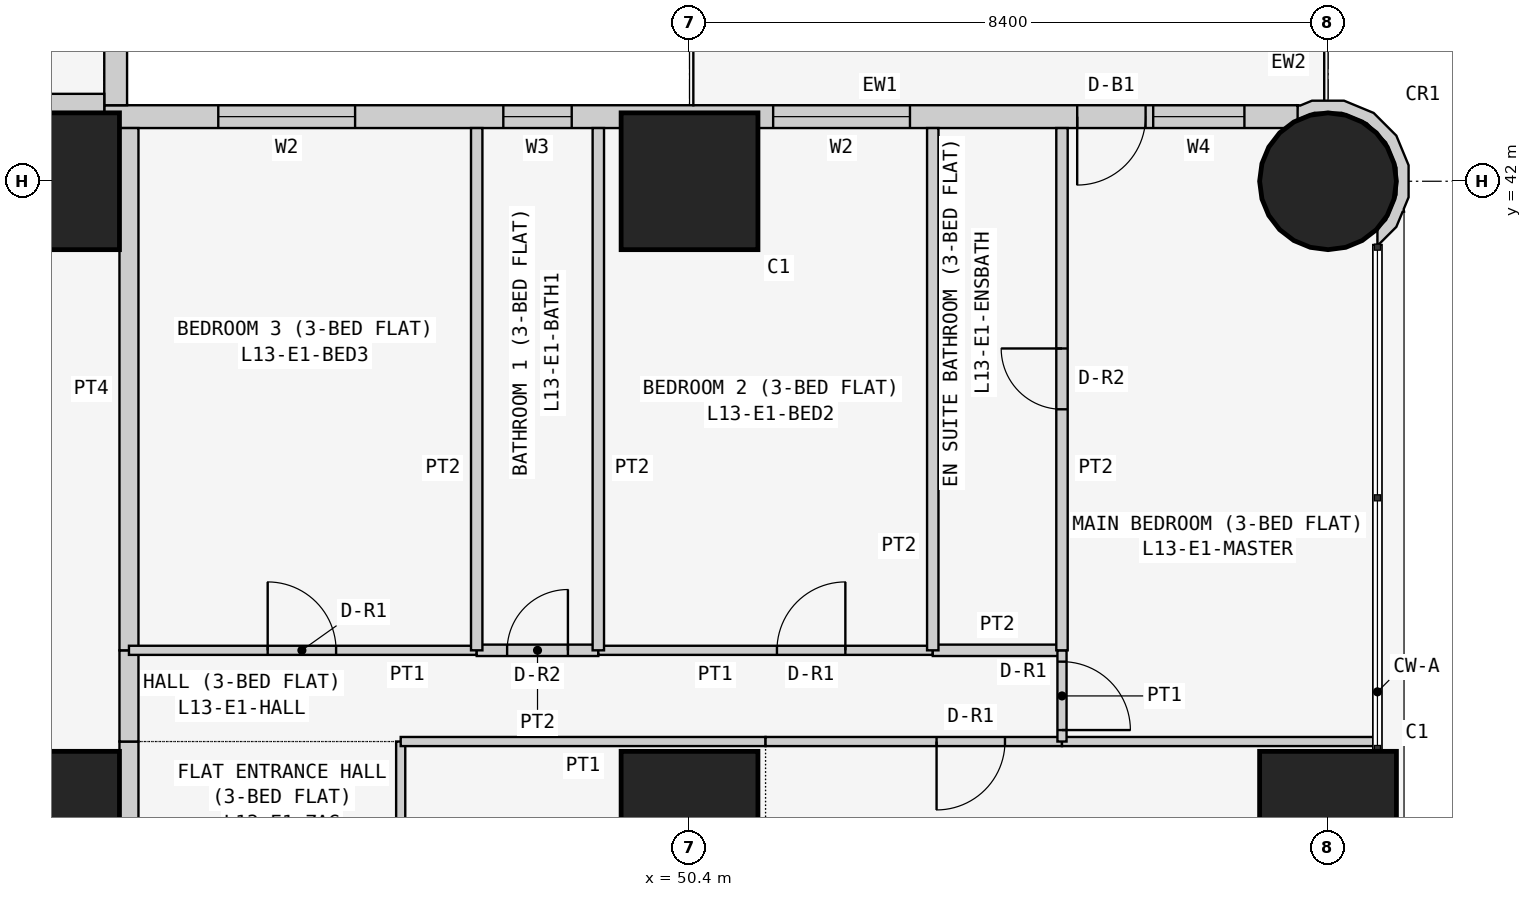
"""IFC4 building model, lengths in metres.
Left out: names, types, materials, properties, quantities, classifications, styles, units other than length and angle.
Written with IfcOpenShell. Run it as: python <this file> out.ifc"""

import sys

from ifc_helpers import new_model, si_unit, direction, frame, frame_2d, origin, origin_2d, place, context, subcontext, project, spatial, polyline, rectangle, circle, outline, extrude, element, fill, save


model = new_model("IFC4")
c1 = context("Model", 3, precision=1e-05, world=origin(), true_north=direction((0.0, 1.0)))
c2 = subcontext(c1, "Body", "Model", "MODEL_VIEW")
j1 = project(units=[si_unit("LENGTHUNIT", "METRE"), si_unit("PLANEANGLEUNIT", "RADIAN")], contexts=[c1])
p1 = place(None, origin())
s1 = spatial("IfcSite", under=j1, at=p1, CompositionType="ELEMENT")
p2 = place(p1, origin())
s2 = spatial("IfcBuilding", under=s1, at=p2, CompositionType="ELEMENT")
p3 = place(p2, frame((0.0, 0.0, 56.1)))
s3 = spatial("IfcBuildingStorey", under=s2, at=p3, CompositionType="ELEMENT", Elevation=56.1)
for number, where, z_axis, x_axis in (
    (1, (42.0, 33.6, 0.0), (0.0, 0.0, 1.0), (1.0, 0.0, 0.0)),
    (2, (42.0, 42.0, 0.0), (0.0, 0.0, 1.0), (1.0, 0.0, 0.0)),
    (3, (50.4, 33.6, 0.0), (0.0, 0.0, 1.0), (1.0, 0.0, 0.0)),
    (4, (50.4, 42.0, 0.0), (0.0, 0.0, 1.0), (1.0, 0.0, 0.0)),
    (5, (58.8, 33.6, 0.0), (0.0, 0.0, 1.0), (1.0, 0.0, 0.0)),
):
    element("IfcColumn", number, at=place(p3, frame(where, z_axis=z_axis, x_axis=x_axis)), inside=s3, PredefinedType="COLUMN", context=c2, shape_type="SweptSolid", body=[
        extrude(rectangle(XDim=1.8, YDim=1.8, at=origin_2d()), origin(), (0.0, 0.0, 1.0), 3.6),
    ])
p4 = place(p3, frame((58.8, 42.0, 0.0), z_axis=(0.0, 0.0, 1.0), x_axis=(1.0, 0.0, 0.0)))
e6 = element("IfcColumn", 6, at=p4, inside=s3, PredefinedType="COLUMN", context=c2, shape_type="SweptSolid", body=[
    extrude(circle(Radius=0.9, at=origin_2d()), origin(), (0.0, 0.0, 1.0), 3.6),
])
p5 = place(p3, frame((58.4, 42.85, 0.0), z_axis=(0.0, 0.0, 1.0), x_axis=(-1.0, 0.0, 0.0)))
e7 = element("IfcWall", 7, at=p5, inside=s3, PredefinedType="SOLIDWALL", context=c2, shape_type="SweptSolid", body=[
    extrude(rectangle(XDim=15.7, YDim=0.3, at=frame_2d((7.85, 0.0))), origin(), (0.0, 0.0, 1.0), 3.45),
])
p6 = place(p5, frame((12.4, 0.0, 0.9)))
e8 = element("IfcOpeningElement", 8, at=p6, cuts=e7, PredefinedType="OPENING", context=c2, shape_type="SweptSolid", body=[
    extrude(rectangle(XDim=1.8, YDim=1.5, at=frame_2d((0.9, 0.75))), frame((0.0, 0.16, 0.0), z_axis=(0.0, -1.0, 0.0), x_axis=(1.0, 0.0, 0.0)), (0.0, 0.0, 1.0), 0.32),
])
p7 = place(p5, frame((9.55, 0.0, 1.5)))
e9 = element("IfcOpeningElement", 9, at=p7, cuts=e7, PredefinedType="OPENING", context=c2, shape_type="SweptSolid", body=[
    extrude(rectangle(XDim=0.9, YDim=0.7, at=frame_2d((0.45, 0.35))), frame((0.0, 0.16, 0.0), z_axis=(0.0, -1.0, 0.0), x_axis=(1.0, 0.0, 0.0)), (0.0, 0.0, 1.0), 0.32),
])
p8 = place(p5, frame((5.1, 0.0, 0.9)))
e10 = element("IfcOpeningElement", 10, at=p8, cuts=e7, PredefinedType="OPENING", context=c2, shape_type="SweptSolid", body=[
    extrude(rectangle(XDim=1.8, YDim=1.5, at=frame_2d((0.9, 0.75))), frame((0.0, 0.16, 0.0), z_axis=(0.0, -1.0, 0.0), x_axis=(1.0, 0.0, 0.0)), (0.0, 0.0, 1.0), 0.32),
])
p9 = place(p5, frame((2.0, 0.0, 0.0)))
e11 = element("IfcOpeningElement", 11, at=p9, cuts=e7, PredefinedType="OPENING", context=c2, shape_type="SweptSolid", body=[
    extrude(rectangle(XDim=0.9, YDim=2.4, at=frame_2d((0.45, 1.2))), frame((0.0, 0.16, 0.0), z_axis=(0.0, -1.0, 0.0), x_axis=(1.0, 0.0, 0.0)), (0.0, 0.0, 1.0), 0.32),
])
p10 = place(p5, frame((0.7, 0.0, 0.9)))
e12 = element("IfcOpeningElement", 12, at=p10, cuts=e7, PredefinedType="OPENING", context=c2, shape_type="SweptSolid", body=[
    extrude(rectangle(XDim=1.2, YDim=1.5, at=frame_2d((0.6, 0.75))), frame((0.0, 0.16, 0.0), z_axis=(0.0, -1.0, 0.0), x_axis=(1.0, 0.0, 0.0)), (0.0, 0.0, 1.0), 0.32),
])
p11 = place(p3, frame((42.85, 43.0, 0.0), z_axis=(0.0, 0.0, 1.0), x_axis=(0.0, 1.0, 0.0)))
e13 = element("IfcWall", 13, at=p11, inside=s3, PredefinedType="SOLIDWALL", context=c2, shape_type="SweptSolid", body=[
    extrude(rectangle(XDim=15.4, YDim=0.3, at=frame_2d((7.7, 0.0))), origin(), (0.0, 0.0, 1.0), 3.45),
])
p12 = place(p11, frame((1.2, 0.0, 0.9)))
e14 = element("IfcOpeningElement", 14, at=p12, cuts=e13, PredefinedType="OPENING", context=c2, shape_type="SweptSolid", body=[
    extrude(rectangle(XDim=1.8, YDim=1.5, at=frame_2d((0.9, 0.75))), frame((0.0, 0.16, 0.0), z_axis=(0.0, -1.0, 0.0), x_axis=(1.0, 0.0, 0.0)), (0.0, 0.0, 1.0), 0.32),
])
p13 = place(p11, frame((4.95, 0.0, 1.5)))
e15 = element("IfcOpeningElement", 15, at=p13, cuts=e13, PredefinedType="OPENING", context=c2, shape_type="SweptSolid", body=[
    extrude(rectangle(XDim=0.9, YDim=0.7, at=frame_2d((0.45, 0.35))), frame((0.0, 0.16, 0.0), z_axis=(0.0, -1.0, 0.0), x_axis=(1.0, 0.0, 0.0)), (0.0, 0.0, 1.0), 0.32),
])
p14 = place(p11, frame((8.5, 0.0, 0.9)))
e16 = element("IfcOpeningElement", 16, at=p14, cuts=e13, PredefinedType="OPENING", context=c2, shape_type="SweptSolid", body=[
    extrude(rectangle(XDim=1.8, YDim=1.5, at=frame_2d((0.9, 0.75))), frame((0.0, 0.16, 0.0), z_axis=(0.0, -1.0, 0.0), x_axis=(1.0, 0.0, 0.0)), (0.0, 0.0, 1.0), 0.32),
])
p15 = place(p11, frame((12.5, 0.0, 0.0)))
e17 = element("IfcOpeningElement", 17, at=p15, cuts=e13, PredefinedType="OPENING", context=c2, shape_type="SweptSolid", body=[
    extrude(rectangle(XDim=0.9, YDim=2.4, at=frame_2d((0.45, 1.2))), frame((0.0, 0.16, 0.0), z_axis=(0.0, -1.0, 0.0), x_axis=(1.0, 0.0, 0.0)), (0.0, 0.0, 1.0), 0.32),
])
p16 = place(p11, frame((13.5, 0.0, 0.9)))
e18 = element("IfcOpeningElement", 18, at=p16, cuts=e13, PredefinedType="OPENING", context=c2, shape_type="SweptSolid", body=[
    extrude(rectangle(XDim=1.2, YDim=1.5, at=frame_2d((0.6, 0.75))), frame((0.0, 0.16, 0.0), z_axis=(0.0, -1.0, 0.0), x_axis=(1.0, 0.0, 0.0)), (0.0, 0.0, 1.0), 0.32),
])
p17 = place(p3, frame((59.411, 41.233, 0.0), z_axis=(0.0, 0.0, 1.0), x_axis=(0.926129809145, 0.377204953059, 0.0)))
e19 = element("IfcWall", 19, at=p17, inside=s3, PredefinedType="SOLIDWALL", context=c2, shape_type="SweptSolid", body=[
    extrude(outline(polyline([(0.626, 0.345), (0.785, 0.736), (0.782, 1.157), (0.619, 1.546), (0.319, 1.843), (-0.072, 2.002), (-0.24, 2.001), (-0.27, 2.017), (-0.37, 1.841), (-0.102, 1.842), (0.23, 1.707), (0.485, 1.455), (0.624, 1.125), (0.626, 0.766), (0.491, 0.434), (0.238, 0.179), (0.09, 0.117), (0.011, -0.078), (0.024, -0.083), (0.329, 0.045), (0.48, 0.198), (0.499, 0.193), (0.508, 0.225), (0.626, 0.345)])), origin(), (0.0, 0.0, 1.0), 3.45),
])
p18 = place(p3, frame((35.829, 43.025, 0.0), z_axis=(0.0, 0.0, 1.0), x_axis=(1.0, 0.0, 0.0)))
e20 = element("IfcWall", 20, at=p18, inside=s3, PredefinedType="PARTITIONING", context=c2, shape_type="SweptSolid", body=[
    extrude(rectangle(XDim=6.871, YDim=0.25, at=frame_2d((3.436, 0.0))), origin(), (0.0, 0.0, 1.0), 3.45),
])
p19 = place(p3, frame((43.025, 34.629, 0.0), z_axis=(0.0, 0.0, 1.0), x_axis=(0.0, -1.0, 0.0)))
e21 = element("IfcWall", 21, at=p19, inside=s3, PredefinedType="PARTITIONING", context=c2, shape_type="SweptSolid", body=[
    extrude(rectangle(XDim=5.229, YDim=0.25, at=frame_2d((2.615, 0.0))), origin(), (0.0, 0.0, 1.0), 3.45),
])
p20 = place(p19, frame((2.129, 0.0, 0.0)))
e22 = element("IfcOpeningElement", 22, at=p20, cuts=e21, PredefinedType="OPENING", context=c2, shape_type="SweptSolid", body=[
    extrude(rectangle(XDim=1.0, YDim=2.1, at=frame_2d((0.5, 1.05))), frame((0.0, 0.135, 0.0), z_axis=(0.0, -1.0, 0.0), x_axis=(1.0, 0.0, 0.0)), (0.0, 0.0, 1.0), 0.27),
])
p21 = place(p3, frame((43.025, 35.829, 0.0), z_axis=(0.0, 0.0, 1.0), x_axis=(0.0, -1.0, 0.0)))
e23 = element("IfcWall", 23, at=p21, inside=s3, PredefinedType="PARTITIONING", context=c2, shape_type="SweptSolid", body=[
    extrude(rectangle(XDim=1.2, YDim=0.25, at=frame_2d((0.6, 0.0))), origin(), (0.0, 0.0, 1.0), 3.45),
])
p22 = place(p3, frame((43.025, 42.7, 0.0), z_axis=(0.0, 0.0, 1.0), x_axis=(0.0, -1.0, 0.0)))
e24 = element("IfcWall", 24, at=p22, inside=s3, PredefinedType="PARTITIONING", context=c2, shape_type="SweptSolid", body=[
    extrude(rectangle(XDim=6.871, YDim=0.25, at=frame_2d((3.436, 0.0))), origin(), (0.0, 0.0, 1.0), 3.45),
])
p23 = place(p3, frame((46.6, 29.4, 0.0), z_axis=(0.0, 0.0, 1.0), x_axis=(0.0, 1.0, 0.0)))
e25 = element("IfcWall", 25, at=p23, inside=s3, PredefinedType="PARTITIONING", context=c2, shape_type="SweptSolid", body=[
    extrude(rectangle(XDim=5.229, YDim=0.12, at=frame_2d((2.615, 0.0))), origin(), (0.0, 0.0, 1.0), 3.45),
])
p24 = place(p23, frame((1.05, 0.0, 0.0)))
e26 = element("IfcOpeningElement", 26, at=p24, cuts=e25, PredefinedType="OPENING", context=c2, shape_type="SweptSolid", body=[
    extrude(rectangle(XDim=0.9, YDim=2.1, at=frame_2d((0.45, 1.05))), frame((0.0, 0.07, 0.0), z_axis=(0.0, -1.0, 0.0), x_axis=(1.0, 0.0, 0.0)), (0.0, 0.0, 1.0), 0.14),
])
p25 = place(p3, frame((51.4, 34.629, 0.0), z_axis=(0.0, 0.0, 1.0), x_axis=(-1.0, 0.0, 0.0)))
e27 = element("IfcWall", 27, at=p25, inside=s3, PredefinedType="PARTITIONING", context=c2, shape_type="SweptSolid", body=[
    extrude(rectangle(XDim=4.8, YDim=0.12, at=frame_2d((2.4, 0.0))), origin(), (0.0, 0.0, 1.0), 3.45),
])
p26 = place(p3, frame((55.3, 34.629, 0.0), z_axis=(0.0, 0.0, 1.0), x_axis=(-1.0, 0.0, 0.0)))
e28 = element("IfcWall", 28, at=p26, inside=s3, PredefinedType="PARTITIONING", context=c2, shape_type="SweptSolid", body=[
    extrude(rectangle(XDim=3.9, YDim=0.12, at=frame_2d((1.95, 0.0))), origin(), (0.0, 0.0, 1.0), 3.45),
])
p27 = place(p26, frame((0.75, 0.0, 0.0)))
e29 = element("IfcOpeningElement", 29, at=p27, cuts=e28, PredefinedType="OPENING", context=c2, shape_type="SweptSolid", body=[
    extrude(rectangle(XDim=0.9, YDim=2.1, at=frame_2d((0.45, 1.05))), frame((0.0, 0.07, 0.0), z_axis=(0.0, -1.0, 0.0), x_axis=(1.0, 0.0, 0.0)), (0.0, 0.0, 1.0), 0.14),
])
p28 = place(p3, frame((59.45, 34.629, 0.0), z_axis=(0.0, 0.0, 1.0), x_axis=(-1.0, 0.0, 0.0)))
e30 = element("IfcWall", 30, at=p28, inside=s3, PredefinedType="PARTITIONING", context=c2, shape_type="SweptSolid", body=[
    extrude(rectangle(XDim=4.15, YDim=0.12, at=frame_2d((2.075, 0.0))), origin(), (0.0, 0.0, 1.0), 3.45),
])
p29 = place(p3, frame((47.6, 35.829, 0.0), z_axis=(0.0, 0.0, 1.0), x_axis=(-1.0, 0.0, 0.0)))
e31 = element("IfcWall", 31, at=p29, inside=s3, PredefinedType="PARTITIONING", context=c2, shape_type="SweptSolid", body=[
    extrude(rectangle(XDim=4.575, YDim=0.12, at=frame_2d((2.288, 0.0))), origin(), (0.0, 0.0, 1.0), 3.45),
])
p30 = place(p29, frame((1.85, 0.0, 0.0)))
e32 = element("IfcOpeningElement", 32, at=p30, cuts=e31, PredefinedType="OPENING", context=c2, shape_type="SweptSolid", body=[
    extrude(rectangle(XDim=0.9, YDim=2.1, at=frame_2d((0.45, 1.05))), frame((0.0, 0.07, 0.0), z_axis=(0.0, -1.0, 0.0), x_axis=(1.0, 0.0, 0.0)), (0.0, 0.0, 1.0), 0.14),
])
p31 = place(p3, frame((49.2, 35.829, 0.0), z_axis=(0.0, 0.0, 1.0), x_axis=(-1.0, 0.0, 0.0)))
e33 = element("IfcWall", 33, at=p31, inside=s3, PredefinedType="PARTITIONING", context=c2, shape_type="SweptSolid", body=[
    extrude(rectangle(XDim=1.6, YDim=0.15, at=frame_2d((0.8, 0.0))), origin(), (0.0, 0.0, 1.0), 3.45),
])
p32 = place(p31, frame((0.4, 0.0, 0.0)))
e34 = element("IfcOpeningElement", 34, at=p32, cuts=e33, PredefinedType="OPENING", context=c2, shape_type="SweptSolid", body=[
    extrude(rectangle(XDim=0.8, YDim=2.1, at=frame_2d((0.4, 1.05))), frame((0.0, 0.085, 0.0), z_axis=(0.0, -1.0, 0.0), x_axis=(1.0, 0.0, 0.0)), (0.0, 0.0, 1.0), 0.17),
])
p33 = place(p3, frame((53.6, 35.829, 0.0), z_axis=(0.0, 0.0, 1.0), x_axis=(-1.0, 0.0, 0.0)))
e35 = element("IfcWall", 35, at=p33, inside=s3, PredefinedType="PARTITIONING", context=c2, shape_type="SweptSolid", body=[
    extrude(rectangle(XDim=4.4, YDim=0.12, at=frame_2d((2.2, 0.0))), origin(), (0.0, 0.0, 1.0), 3.45),
])
p34 = place(p33, frame((1.15, 0.0, 0.0)))
e36 = element("IfcOpeningElement", 36, at=p34, cuts=e35, PredefinedType="OPENING", context=c2, shape_type="SweptSolid", body=[
    extrude(rectangle(XDim=0.9, YDim=2.1, at=frame_2d((0.45, 1.05))), frame((0.0, 0.07, 0.0), z_axis=(0.0, -1.0, 0.0), x_axis=(1.0, 0.0, 0.0)), (0.0, 0.0, 1.0), 0.14),
])
p35 = place(p3, frame((55.3, 35.829, 0.0), z_axis=(0.0, 0.0, 1.0), x_axis=(-1.0, 0.0, 0.0)))
e37 = element("IfcWall", 37, at=p35, inside=s3, PredefinedType="PARTITIONING", context=c2, shape_type="SweptSolid", body=[
    extrude(rectangle(XDim=1.7, YDim=0.15, at=frame_2d((0.85, 0.0))), origin(), (0.0, 0.0, 1.0), 3.45),
])
p36 = place(p3, frame((55.3, 34.629, 0.0), z_axis=(0.0, 0.0, 1.0), x_axis=(0.0, 1.0, 0.0)))
e38 = element("IfcWall", 38, at=p36, inside=s3, PredefinedType="PARTITIONING", context=c2, shape_type="SweptSolid", body=[
    extrude(rectangle(XDim=1.2, YDim=0.12, at=frame_2d((0.6, 0.0))), origin(), (0.0, 0.0, 1.0), 3.45),
])
p37 = place(p36, frame((0.151, 0.0, 0.0)))
e39 = element("IfcOpeningElement", 39, at=p37, cuts=e38, PredefinedType="OPENING", context=c2, shape_type="SweptSolid", body=[
    extrude(rectangle(XDim=0.9, YDim=2.1, at=frame_2d((0.45, 1.05))), frame((0.0, 0.07, 0.0), z_axis=(0.0, -1.0, 0.0), x_axis=(1.0, 0.0, 0.0)), (0.0, 0.0, 1.0), 0.14),
])
for number, where, z_axis, x_axis in (
    (40, (47.6, 35.829, 0.0), (0.0, 0.0, 1.0), (0.0, 1.0, 0.0)),
    (41, (49.2, 35.829, 0.0), (0.0, 0.0, 1.0), (0.0, 1.0, 0.0)),
    (42, (53.6, 35.829, 0.0), (0.0, 0.0, 1.0), (0.0, 1.0, 0.0)),
):
    element("IfcWall", number, at=place(p3, frame(where, z_axis=z_axis, x_axis=x_axis)), inside=s3, PredefinedType="PARTITIONING", context=c2, shape_type="SweptSolid", body=[
        extrude(rectangle(XDim=6.871, YDim=0.15, at=frame_2d((3.436, 0.0))), origin(), (0.0, 0.0, 1.0), 3.45),
    ])
p38 = place(p3, frame((55.3, 35.829, 0.0), z_axis=(0.0, 0.0, 1.0), x_axis=(0.0, 1.0, 0.0)))
e43 = element("IfcWall", 43, at=p38, inside=s3, PredefinedType="PARTITIONING", context=c2, shape_type="SweptSolid", body=[
    extrude(rectangle(XDim=6.871, YDim=0.15, at=frame_2d((3.436, 0.0))), origin(), (0.0, 0.0, 1.0), 3.45),
])
p39 = place(p38, frame((3.171, 0.0, 0.0)))
e44 = element("IfcOpeningElement", 44, at=p39, cuts=e43, PredefinedType="OPENING", context=c2, shape_type="SweptSolid", body=[
    extrude(rectangle(XDim=0.8, YDim=2.1, at=frame_2d((0.4, 1.05))), frame((0.0, 0.085, 0.0), z_axis=(0.0, -1.0, 0.0), x_axis=(1.0, 0.0, 0.0)), (0.0, 0.0, 1.0), 0.17),
])
p40 = place(p6, origin())
e45 = element("IfcWindow", 45, at=p40, inside=s3, PartitioningType="SINGLE_PANEL", PredefinedType="WINDOW", context=c2, shape_type="SweptSolid", body=[
    extrude(rectangle(XDim=1.8, YDim=1.5, at=frame_2d((0.9, 0.75))), frame((0.0, 0.03, 0.0), z_axis=(0.0, -1.0, 0.0), x_axis=(1.0, 0.0, 0.0)), (0.0, 0.0, 1.0), 0.06),
])
fill(e8, e45)
p41 = place(p7, origin())
e46 = element("IfcWindow", 46, at=p41, inside=s3, PartitioningType="SINGLE_PANEL", PredefinedType="WINDOW", context=c2, shape_type="SweptSolid", body=[
    extrude(rectangle(XDim=0.9, YDim=0.7, at=frame_2d((0.45, 0.35))), frame((0.0, 0.03, 0.0), z_axis=(0.0, -1.0, 0.0), x_axis=(1.0, 0.0, 0.0)), (0.0, 0.0, 1.0), 0.06),
])
fill(e9, e46)
p42 = place(p8, origin())
e47 = element("IfcWindow", 47, at=p42, inside=s3, PartitioningType="SINGLE_PANEL", PredefinedType="WINDOW", context=c2, shape_type="SweptSolid", body=[
    extrude(rectangle(XDim=1.8, YDim=1.5, at=frame_2d((0.9, 0.75))), frame((0.0, 0.03, 0.0), z_axis=(0.0, -1.0, 0.0), x_axis=(1.0, 0.0, 0.0)), (0.0, 0.0, 1.0), 0.06),
])
fill(e10, e47)
p43 = place(p9, origin())
e48 = element("IfcDoor", 48, at=p43, inside=s3, OperationType="SINGLE_SWING_RIGHT", PredefinedType="DOOR", context=c2, shape_type="SweptSolid", body=[
    extrude(rectangle(XDim=0.9, YDim=2.4, at=frame_2d((0.45, 1.2))), frame((0.0, 0.025, 0.0), z_axis=(0.0, -1.0, 0.0), x_axis=(1.0, 0.0, 0.0)), (0.0, 0.0, 1.0), 0.05),
])
fill(e11, e48)
p44 = place(p10, origin())
e49 = element("IfcWindow", 49, at=p44, inside=s3, PartitioningType="SINGLE_PANEL", PredefinedType="WINDOW", context=c2, shape_type="SweptSolid", body=[
    extrude(rectangle(XDim=1.2, YDim=1.5, at=frame_2d((0.6, 0.75))), frame((0.0, 0.03, 0.0), z_axis=(0.0, -1.0, 0.0), x_axis=(1.0, 0.0, 0.0)), (0.0, 0.0, 1.0), 0.06),
])
fill(e12, e49)
p45 = place(p27, origin())
e50 = element("IfcDoor", 50, at=p45, inside=s3, OperationType="SINGLE_SWING_RIGHT", PredefinedType="DOOR", context=c2, shape_type="SweptSolid", body=[
    extrude(rectangle(XDim=0.9, YDim=2.1, at=frame_2d((0.45, 1.05))), frame((0.0, 0.025, 0.0), z_axis=(0.0, -1.0, 0.0), x_axis=(1.0, 0.0, 0.0)), (0.0, 0.0, 1.0), 0.05),
])
fill(e29, e50)
p46 = place(p30, frame((0.9, 0.0, 0.0), z_axis=(0.0, 0.0, 1.0), x_axis=(-1.0, 0.0, 0.0)))
e51 = element("IfcDoor", 51, at=p46, inside=s3, OperationType="SINGLE_SWING_LEFT", PredefinedType="DOOR", context=c2, shape_type="SweptSolid", body=[
    extrude(rectangle(XDim=0.9, YDim=2.1, at=frame_2d((0.45, 1.05))), frame((0.0, 0.025, 0.0), z_axis=(0.0, -1.0, 0.0), x_axis=(1.0, 0.0, 0.0)), (0.0, 0.0, 1.0), 0.05),
])
fill(e32, e51)
p47 = place(p32, frame((0.8, 0.0, 0.0), z_axis=(0.0, 0.0, 1.0), x_axis=(-1.0, 0.0, 0.0)))
e52 = element("IfcDoor", 52, at=p47, inside=s3, OperationType="SINGLE_SWING_RIGHT", PredefinedType="DOOR", context=c2, shape_type="SweptSolid", body=[
    extrude(rectangle(XDim=0.8, YDim=2.1, at=frame_2d((0.4, 1.05))), frame((0.0, 0.025, 0.0), z_axis=(0.0, -1.0, 0.0), x_axis=(1.0, 0.0, 0.0)), (0.0, 0.0, 1.0), 0.05),
])
fill(e34, e52)
p48 = place(p34, frame((0.9, 0.0, 0.0), z_axis=(0.0, 0.0, 1.0), x_axis=(-1.0, 0.0, 0.0)))
e53 = element("IfcDoor", 53, at=p48, inside=s3, OperationType="SINGLE_SWING_RIGHT", PredefinedType="DOOR", context=c2, shape_type="SweptSolid", body=[
    extrude(rectangle(XDim=0.9, YDim=2.1, at=frame_2d((0.45, 1.05))), frame((0.0, 0.025, 0.0), z_axis=(0.0, -1.0, 0.0), x_axis=(1.0, 0.0, 0.0)), (0.0, 0.0, 1.0), 0.05),
])
fill(e36, e53)
p49 = place(p37, frame((0.9, 0.0, 0.0), z_axis=(0.0, 0.0, 1.0), x_axis=(-1.0, 0.0, 0.0)))
e54 = element("IfcDoor", 54, at=p49, inside=s3, OperationType="SINGLE_SWING_RIGHT", PredefinedType="DOOR", context=c2, shape_type="SweptSolid", body=[
    extrude(rectangle(XDim=0.9, YDim=2.1, at=frame_2d((0.45, 1.05))), frame((0.0, 0.025, 0.0), z_axis=(0.0, -1.0, 0.0), x_axis=(1.0, 0.0, 0.0)), (0.0, 0.0, 1.0), 0.05),
])
fill(e39, e54)
p50 = place(p39, origin())
e55 = element("IfcDoor", 55, at=p50, inside=s3, OperationType="SINGLE_SWING_RIGHT", PredefinedType="DOOR", context=c2, shape_type="SweptSolid", body=[
    extrude(rectangle(XDim=0.8, YDim=2.1, at=frame_2d((0.4, 1.05))), frame((0.0, 0.025, 0.0), z_axis=(0.0, -1.0, 0.0), x_axis=(1.0, 0.0, 0.0)), (0.0, 0.0, 1.0), 0.05),
])
fill(e44, e55)
save(model, sys.argv[1])
